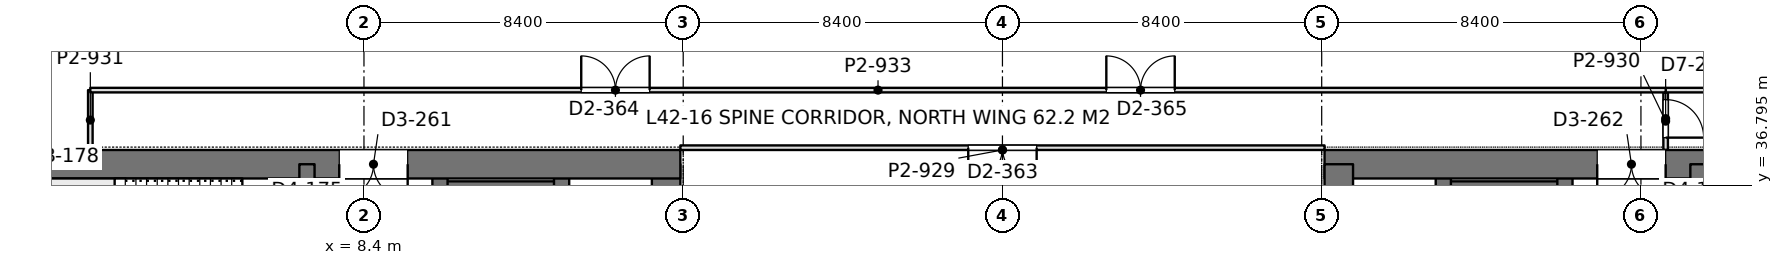
"""IFC4 building model, lengths in metres.
Left out: names, types, materials, properties, quantities, classifications, styles, units other than length and angle.
Written with IfcOpenShell. Run it as: python <this file> out.ifc"""

import sys

from ifc_helpers import new_model, si_unit, direction, frame, frame_2d, origin, place, context, subcontext, project, spatial, rectangle, extrude, element, fill, save


model = new_model("IFC4")
c1 = context("Model", 3, precision=1e-05, world=origin(), true_north=direction((0.0, 1.0)))
c2 = subcontext(c1, "Body", "Model", "MODEL_VIEW")
j1 = project(units=[si_unit("LENGTHUNIT", "METRE"), si_unit("PLANEANGLEUNIT", "RADIAN")], contexts=[c1])
p1 = place(None, origin())
s1 = spatial("IfcSite", under=j1, at=p1, CompositionType="ELEMENT")
p2 = place(p1, origin())
s2 = spatial("IfcBuilding", under=s1, at=p2, CompositionType="ELEMENT")
p3 = place(p2, frame((0.0, 0.0, 186.0)))
s3 = spatial("IfcBuildingStorey", under=s2, at=p3, CompositionType="ELEMENT", Elevation=186.0)
p4 = place(p3, frame((-1.125, 37.35, 0.0), z_axis=(0.0, 0.0, 1.0), x_axis=(1.0, 0.0, 0.0)))
e1 = element("IfcWall", 1, at=p4, inside=s3, PredefinedType="SHEAR", context=c2, shape_type="SweptSolid", body=[
    extrude(rectangle(XDim=17.85, YDim=0.75, at=frame_2d((8.925, 0.0))), origin(), (0.0, 0.0, 1.0), 4.2),
])
p5 = place(p4, frame((8.875, 0.0, 0.0)))
e2 = element("IfcOpeningElement", 2, at=p5, cuts=e1, PredefinedType="OPENING", context=c2, shape_type="SweptSolid", body=[
    extrude(rectangle(XDim=1.8, YDim=2.4, at=frame_2d((0.9, 1.2))), frame((0.0, 0.385, 0.0), z_axis=(0.0, -1.0, 0.0), x_axis=(1.0, 0.0, 0.0)), (0.0, 0.0, 1.0), 0.77),
])
p6 = place(p3, frame((16.35, 27.8, 0.0), z_axis=(0.0, 0.0, 1.0), x_axis=(0.0, 1.0, 0.0)))
e3 = element("IfcWall", 3, at=p6, inside=s3, PredefinedType="SHEAR", context=c2, shape_type="SweptSolid", body=[
    extrude(rectangle(XDim=9.55, YDim=0.75, at=frame_2d((4.775, 0.0))), origin(), (0.0, 0.0, 1.0), 4.2),
])
p7 = place(p3, frame((6.9, 13.05, 0.0), z_axis=(0.0, 0.0, 1.0), x_axis=(0.0, 1.0, 0.0)))
e4 = element("IfcWall", 4, at=p7, inside=s3, PredefinedType="SHEAR", context=c2, shape_type="SweptSolid", body=[
    extrude(rectangle(XDim=24.3, YDim=0.4, at=frame_2d((12.15, 0.0))), origin(), (0.0, 0.0, 1.0), 4.2),
])
p8 = place(p7, frame((1.3, 0.0, 0.0)))
e5 = element("IfcOpeningElement", 5, at=p8, cuts=e4, PredefinedType="OPENING", context=c2, shape_type="SweptSolid", body=[
    extrude(rectangle(XDim=1.0, YDim=2.2, at=frame_2d((0.5, 1.1))), frame((0.0, 0.21, 0.0), z_axis=(0.0, -1.0, 0.0), x_axis=(1.0, 0.0, 0.0)), (0.0, 0.0, 1.0), 0.42),
])
p9 = place(p7, frame((22.0, 0.0, 0.0)))
e6 = element("IfcOpeningElement", 6, at=p9, cuts=e4, PredefinedType="OPENING", context=c2, shape_type="SweptSolid", body=[
    extrude(rectangle(XDim=1.0, YDim=2.2, at=frame_2d((0.5, 1.1))), frame((0.0, 0.21, 0.0), z_axis=(0.0, -1.0, 0.0), x_axis=(1.0, 0.0, 0.0)), (0.0, 0.0, 1.0), 0.42),
])
p10 = place(p7, frame((5.55, 0.0, 0.0)))
e7 = element("IfcOpeningElement", 7, at=p10, cuts=e4, PredefinedType="OPENING", context=c2, shape_type="SweptSolid", body=[
    extrude(rectangle(XDim=1.0, YDim=2.2, at=frame_2d((0.5, 1.1))), frame((0.0, 0.21, 0.0), z_axis=(0.0, -1.0, 0.0), x_axis=(1.0, 0.0, 0.0)), (0.0, 0.0, 1.0), 0.42),
])
p11 = place(p7, frame((9.55, 0.0, 0.0)))
e8 = element("IfcOpeningElement", 8, at=p11, cuts=e4, PredefinedType="OPENING", context=c2, shape_type="SweptSolid", body=[
    extrude(rectangle(XDim=1.0, YDim=2.2, at=frame_2d((0.5, 1.1))), frame((0.0, 0.21, 0.0), z_axis=(0.0, -1.0, 0.0), x_axis=(1.0, 0.0, 0.0)), (0.0, 0.0, 1.0), 0.42),
])
p12 = place(p7, frame((12.8, 0.0, 0.0)))
e9 = element("IfcOpeningElement", 9, at=p12, cuts=e4, PredefinedType="OPENING", context=c2, shape_type="SweptSolid", body=[
    extrude(rectangle(XDim=1.1, YDim=2.2, at=frame_2d((0.55, 1.1))), frame((0.0, 0.21, 0.0), z_axis=(0.0, -1.0, 0.0), x_axis=(1.0, 0.0, 0.0)), (0.0, 0.0, 1.0), 0.42),
])
p13 = place(p7, frame((15.538, 0.0, 0.0)))
e10 = element("IfcOpeningElement", 10, at=p13, cuts=e4, PredefinedType="OPENING", context=c2, shape_type="SweptSolid", body=[
    extrude(rectangle(XDim=1.1, YDim=2.2, at=frame_2d((0.55, 1.1))), frame((0.0, 0.21, 0.0), z_axis=(0.0, -1.0, 0.0), x_axis=(1.0, 0.0, 0.0)), (0.0, 0.0, 1.0), 0.42),
])
p14 = place(p7, frame((18.262, 0.0, 0.0)))
e11 = element("IfcOpeningElement", 11, at=p14, cuts=e4, PredefinedType="OPENING", context=c2, shape_type="SweptSolid", body=[
    extrude(rectangle(XDim=1.1, YDim=2.2, at=frame_2d((0.55, 1.1))), frame((0.0, 0.21, 0.0), z_axis=(0.0, -1.0, 0.0), x_axis=(1.0, 0.0, 0.0)), (0.0, 0.0, 1.0), 0.42),
])
p15 = place(p3, frame((10.4, 13.05, 0.0), z_axis=(0.0, 0.0, 1.0), x_axis=(0.0, 1.0, 0.0)))
e12 = element("IfcWall", 12, at=p15, inside=s3, PredefinedType="SHEAR", context=c2, shape_type="SweptSolid", body=[
    extrude(rectangle(XDim=24.3, YDim=0.4, at=frame_2d((12.15, 0.0))), origin(), (0.0, 0.0, 1.0), 4.2),
])
p16 = place(p15, frame((15.75, 0.0, 0.0)))
e13 = element("IfcOpeningElement", 13, at=p16, cuts=e12, PredefinedType="OPENING", context=c2, shape_type="SweptSolid", body=[
    extrude(rectangle(XDim=1.1, YDim=2.2, at=frame_2d((0.55, 1.1))), frame((0.0, 0.21, 0.0), z_axis=(0.0, -1.0, 0.0), x_axis=(1.0, 0.0, 0.0)), (0.0, 0.0, 1.0), 0.42),
])
p17 = place(p15, frame((18.6, 0.0, 0.0)))
e14 = element("IfcOpeningElement", 14, at=p17, cuts=e12, PredefinedType="OPENING", context=c2, shape_type="SweptSolid", body=[
    extrude(rectangle(XDim=1.1, YDim=2.2, at=frame_2d((0.55, 1.1))), frame((0.0, 0.21, 0.0), z_axis=(0.0, -1.0, 0.0), x_axis=(1.0, 0.0, 0.0)), (0.0, 0.0, 1.0), 0.42),
])
p18 = place(p15, frame((21.45, 0.0, 0.0)))
e15 = element("IfcOpeningElement", 15, at=p18, cuts=e12, PredefinedType="OPENING", context=c2, shape_type="SweptSolid", body=[
    extrude(rectangle(XDim=1.1, YDim=2.2, at=frame_2d((0.55, 1.1))), frame((0.0, 0.21, 0.0), z_axis=(0.0, -1.0, 0.0), x_axis=(1.0, 0.0, 0.0)), (0.0, 0.0, 1.0), 0.42),
])
p19 = place(p15, frame((6.05, 0.0, 0.0)))
e16 = element("IfcOpeningElement", 16, at=p19, cuts=e12, PredefinedType="OPENING", context=c2, shape_type="SweptSolid", body=[
    extrude(rectangle(XDim=1.8, YDim=2.4, at=frame_2d((0.9, 1.2))), frame((0.0, 0.21, 0.0), z_axis=(0.0, -1.0, 0.0), x_axis=(1.0, 0.0, 0.0)), (0.0, 0.0, 1.0), 0.42),
])
p20 = place(p15, frame((11.25, 0.0, 0.0)))
e17 = element("IfcOpeningElement", 17, at=p20, cuts=e12, PredefinedType="OPENING", context=c2, shape_type="SweptSolid", body=[
    extrude(rectangle(XDim=1.8, YDim=2.4, at=frame_2d((0.9, 1.2))), frame((0.0, 0.21, 0.0), z_axis=(0.0, -1.0, 0.0), x_axis=(1.0, 0.0, 0.0)), (0.0, 0.0, 1.0), 0.42),
])
p21 = place(p3, frame((13.6, 27.925, 0.0), z_axis=(0.0, 0.0, 1.0), x_axis=(0.0, 1.0, 0.0)))
e18 = element("IfcWall", 18, at=p21, inside=s3, PredefinedType="SHEAR", context=c2, shape_type="SweptSolid", body=[
    extrude(rectangle(XDim=9.425, YDim=0.4, at=frame_2d((4.712, 0.0))), origin(), (0.0, 0.0, 1.0), 4.2),
])
p22 = place(p3, frame((10.4, 36.625, 0.0), z_axis=(0.0, 0.0, 1.0), x_axis=(1.0, 0.0, 0.0)))
e19 = element("IfcWall", 19, at=p22, inside=s3, PredefinedType="SHEAR", context=c2, shape_type="SweptSolid", body=[
    extrude(rectangle(XDim=3.2, YDim=0.55, at=frame_2d((1.6, 0.0))), origin(), (0.0, 0.0, 1.0), 4.2),
])
p23 = place(p3, frame((33.675, 37.35, 0.0), z_axis=(0.0, 0.0, 1.0), x_axis=(1.0, 0.0, 0.0)))
e20 = element("IfcWall", 20, at=p23, inside=s3, PredefinedType="SHEAR", context=c2, shape_type="SweptSolid", body=[
    extrude(rectangle(XDim=17.85, YDim=0.75, at=frame_2d((8.925, 0.0))), origin(), (0.0, 0.0, 1.0), 4.2),
])
p24 = place(p23, frame((7.175, 0.0, 0.0)))
e21 = element("IfcOpeningElement", 21, at=p24, cuts=e20, PredefinedType="OPENING", context=c2, shape_type="SweptSolid", body=[
    extrude(rectangle(XDim=1.8, YDim=2.4, at=frame_2d((0.9, 1.2))), frame((0.0, 0.385, 0.0), z_axis=(0.0, -1.0, 0.0), x_axis=(1.0, 0.0, 0.0)), (0.0, 0.0, 1.0), 0.77),
])
p25 = place(p3, frame((34.05, 27.8, 0.0), z_axis=(0.0, 0.0, 1.0), x_axis=(0.0, 1.0, 0.0)))
e22 = element("IfcWall", 22, at=p25, inside=s3, PredefinedType="SHEAR", context=c2, shape_type="SweptSolid", body=[
    extrude(rectangle(XDim=9.55, YDim=0.75, at=frame_2d((4.775, 0.0))), origin(), (0.0, 0.0, 1.0), 4.2),
])
p26 = place(p3, frame((43.5, 13.05, 0.0), z_axis=(0.0, 0.0, 1.0), x_axis=(0.0, 1.0, 0.0)))
e23 = element("IfcWall", 23, at=p26, inside=s3, PredefinedType="SHEAR", context=c2, shape_type="SweptSolid", body=[
    extrude(rectangle(XDim=24.3, YDim=0.4, at=frame_2d((12.15, 0.0))), origin(), (0.0, 0.0, 1.0), 4.2),
])
p27 = place(p26, frame((1.3, 0.0, 0.0)))
e24 = element("IfcOpeningElement", 24, at=p27, cuts=e23, PredefinedType="OPENING", context=c2, shape_type="SweptSolid", body=[
    extrude(rectangle(XDim=1.0, YDim=2.2, at=frame_2d((0.5, 1.1))), frame((0.0, 0.21, 0.0), z_axis=(0.0, -1.0, 0.0), x_axis=(1.0, 0.0, 0.0)), (0.0, 0.0, 1.0), 0.42),
])
p28 = place(p26, frame((22.0, 0.0, 0.0)))
e25 = element("IfcOpeningElement", 25, at=p28, cuts=e23, PredefinedType="OPENING", context=c2, shape_type="SweptSolid", body=[
    extrude(rectangle(XDim=1.0, YDim=2.2, at=frame_2d((0.5, 1.1))), frame((0.0, 0.21, 0.0), z_axis=(0.0, -1.0, 0.0), x_axis=(1.0, 0.0, 0.0)), (0.0, 0.0, 1.0), 0.42),
])
p29 = place(p26, frame((5.55, 0.0, 0.0)))
e26 = element("IfcOpeningElement", 26, at=p29, cuts=e23, PredefinedType="OPENING", context=c2, shape_type="SweptSolid", body=[
    extrude(rectangle(XDim=1.0, YDim=2.2, at=frame_2d((0.5, 1.1))), frame((0.0, 0.21, 0.0), z_axis=(0.0, -1.0, 0.0), x_axis=(1.0, 0.0, 0.0)), (0.0, 0.0, 1.0), 0.42),
])
p30 = place(p26, frame((9.55, 0.0, 0.0)))
e27 = element("IfcOpeningElement", 27, at=p30, cuts=e23, PredefinedType="OPENING", context=c2, shape_type="SweptSolid", body=[
    extrude(rectangle(XDim=1.0, YDim=2.2, at=frame_2d((0.5, 1.1))), frame((0.0, 0.21, 0.0), z_axis=(0.0, -1.0, 0.0), x_axis=(1.0, 0.0, 0.0)), (0.0, 0.0, 1.0), 0.42),
])
p31 = place(p26, frame((12.8, 0.0, 0.0)))
e28 = element("IfcOpeningElement", 28, at=p31, cuts=e23, PredefinedType="OPENING", context=c2, shape_type="SweptSolid", body=[
    extrude(rectangle(XDim=1.1, YDim=2.2, at=frame_2d((0.55, 1.1))), frame((0.0, 0.21, 0.0), z_axis=(0.0, -1.0, 0.0), x_axis=(1.0, 0.0, 0.0)), (0.0, 0.0, 1.0), 0.42),
])
p32 = place(p26, frame((15.538, 0.0, 0.0)))
e29 = element("IfcOpeningElement", 29, at=p32, cuts=e23, PredefinedType="OPENING", context=c2, shape_type="SweptSolid", body=[
    extrude(rectangle(XDim=1.1, YDim=2.2, at=frame_2d((0.55, 1.1))), frame((0.0, 0.21, 0.0), z_axis=(0.0, -1.0, 0.0), x_axis=(1.0, 0.0, 0.0)), (0.0, 0.0, 1.0), 0.42),
])
p33 = place(p26, frame((18.262, 0.0, 0.0)))
e30 = element("IfcOpeningElement", 30, at=p33, cuts=e23, PredefinedType="OPENING", context=c2, shape_type="SweptSolid", body=[
    extrude(rectangle(XDim=1.1, YDim=2.2, at=frame_2d((0.55, 1.1))), frame((0.0, 0.21, 0.0), z_axis=(0.0, -1.0, 0.0), x_axis=(1.0, 0.0, 0.0)), (0.0, 0.0, 1.0), 0.42),
])
p34 = place(p3, frame((40.0, 13.05, 0.0), z_axis=(0.0, 0.0, 1.0), x_axis=(0.0, 1.0, 0.0)))
e31 = element("IfcWall", 31, at=p34, inside=s3, PredefinedType="SHEAR", context=c2, shape_type="SweptSolid", body=[
    extrude(rectangle(XDim=24.3, YDim=0.4, at=frame_2d((12.15, 0.0))), origin(), (0.0, 0.0, 1.0), 4.2),
])
p35 = place(p34, frame((15.75, 0.0, 0.0)))
e32 = element("IfcOpeningElement", 32, at=p35, cuts=e31, PredefinedType="OPENING", context=c2, shape_type="SweptSolid", body=[
    extrude(rectangle(XDim=1.1, YDim=2.2, at=frame_2d((0.55, 1.1))), frame((0.0, 0.21, 0.0), z_axis=(0.0, -1.0, 0.0), x_axis=(1.0, 0.0, 0.0)), (0.0, 0.0, 1.0), 0.42),
])
p36 = place(p34, frame((18.6, 0.0, 0.0)))
e33 = element("IfcOpeningElement", 33, at=p36, cuts=e31, PredefinedType="OPENING", context=c2, shape_type="SweptSolid", body=[
    extrude(rectangle(XDim=1.1, YDim=2.2, at=frame_2d((0.55, 1.1))), frame((0.0, 0.21, 0.0), z_axis=(0.0, -1.0, 0.0), x_axis=(1.0, 0.0, 0.0)), (0.0, 0.0, 1.0), 0.42),
])
p37 = place(p34, frame((21.45, 0.0, 0.0)))
e34 = element("IfcOpeningElement", 34, at=p37, cuts=e31, PredefinedType="OPENING", context=c2, shape_type="SweptSolid", body=[
    extrude(rectangle(XDim=1.1, YDim=2.2, at=frame_2d((0.55, 1.1))), frame((0.0, 0.21, 0.0), z_axis=(0.0, -1.0, 0.0), x_axis=(1.0, 0.0, 0.0)), (0.0, 0.0, 1.0), 0.42),
])
p38 = place(p34, frame((6.05, 0.0, 0.0)))
e35 = element("IfcOpeningElement", 35, at=p38, cuts=e31, PredefinedType="OPENING", context=c2, shape_type="SweptSolid", body=[
    extrude(rectangle(XDim=1.8, YDim=2.4, at=frame_2d((0.9, 1.2))), frame((0.0, 0.21, 0.0), z_axis=(0.0, -1.0, 0.0), x_axis=(1.0, 0.0, 0.0)), (0.0, 0.0, 1.0), 0.42),
])
p39 = place(p34, frame((11.25, 0.0, 0.0)))
e36 = element("IfcOpeningElement", 36, at=p39, cuts=e31, PredefinedType="OPENING", context=c2, shape_type="SweptSolid", body=[
    extrude(rectangle(XDim=1.8, YDim=2.4, at=frame_2d((0.9, 1.2))), frame((0.0, 0.21, 0.0), z_axis=(0.0, -1.0, 0.0), x_axis=(1.0, 0.0, 0.0)), (0.0, 0.0, 1.0), 0.42),
])
p40 = place(p3, frame((36.8, 27.925, 0.0), z_axis=(0.0, 0.0, 1.0), x_axis=(0.0, 1.0, 0.0)))
e37 = element("IfcWall", 37, at=p40, inside=s3, PredefinedType="SHEAR", context=c2, shape_type="SweptSolid", body=[
    extrude(rectangle(XDim=9.425, YDim=0.4, at=frame_2d((4.712, 0.0))), origin(), (0.0, 0.0, 1.0), 4.2),
])
p41 = place(p3, frame((40.0, 36.625, 0.0), z_axis=(0.0, 0.0, 1.0), x_axis=(-1.0, 0.0, 0.0)))
e38 = element("IfcWall", 38, at=p41, inside=s3, PredefinedType="SHEAR", context=c2, shape_type="SweptSolid", body=[
    extrude(rectangle(XDim=3.2, YDim=0.55, at=frame_2d((1.6, 0.0))), origin(), (0.0, 0.0, 1.0), 4.2),
])
p42 = place(p3, frame((1.2, 39.3, 0.0), z_axis=(0.0, 0.0, 1.0), x_axis=(1.0, 0.0, 0.0)))
e39 = element("IfcWall", 39, at=p42, inside=s3, PredefinedType="PARTITIONING", context=c2, shape_type="SweptSolid", body=[
    extrude(rectangle(XDim=41.452, YDim=0.12, at=frame_2d((20.726, 0.0))), origin(), (0.0, 0.0, 1.0), 3.55),
])
p43 = place(p42, frame((12.917, 0.0, 0.0)))
e40 = element("IfcOpeningElement", 40, at=p43, cuts=e39, PredefinedType="OPENING", context=c2, shape_type="SweptSolid", body=[
    extrude(rectangle(XDim=1.8, YDim=2.2, at=frame_2d((0.9, 1.1))), frame((0.0, 0.07, 0.0), z_axis=(0.0, -1.0, 0.0), x_axis=(1.0, 0.0, 0.0)), (0.0, 0.0, 1.0), 0.14),
])
p44 = place(p42, frame((26.733, 0.0, 0.0)))
e41 = element("IfcOpeningElement", 41, at=p44, cuts=e39, PredefinedType="OPENING", context=c2, shape_type="SweptSolid", body=[
    extrude(rectangle(XDim=1.8, YDim=2.2, at=frame_2d((0.9, 1.1))), frame((0.0, 0.07, 0.0), z_axis=(0.0, -1.0, 0.0), x_axis=(1.0, 0.0, 0.0)), (0.0, 0.0, 1.0), 0.14),
])
p45 = place(p3, frame((1.2, 37.724, 0.0), z_axis=(0.0, 0.0, 1.0), x_axis=(0.0, 1.0, 0.0)))
e42 = element("IfcWall", 42, at=p45, inside=s3, PredefinedType="PARTITIONING", context=c2, shape_type="SweptSolid", body=[
    extrude(rectangle(XDim=1.576, YDim=0.12, at=frame_2d((0.788, 0.0))), origin(), (0.0, 0.0, 1.0), 4.05),
])
p46 = place(p3, frame((42.65, 37.724, 0.0), z_axis=(0.0, 0.0, 1.0), x_axis=(0.0, 1.0, 0.0)))
e43 = element("IfcWall", 43, at=p46, inside=s3, PredefinedType="PARTITIONING", context=c2, shape_type="SweptSolid", body=[
    extrude(rectangle(XDim=1.518, YDim=0.12, at=frame_2d((0.759, 0.0))), origin(), (0.0, 0.0, 1.0), 4.05),
])
p47 = place(p46, frame((0.326, 0.0, 0.0)))
e44 = element("IfcOpeningElement", 44, at=p47, cuts=e43, PredefinedType="OPENING", context=c2, shape_type="SweptSolid", body=[
    extrude(rectangle(XDim=1.0, YDim=2.4, at=frame_2d((0.5, 1.2))), frame((0.0, 0.07, 0.0), z_axis=(0.0, -1.0, 0.0), x_axis=(1.0, 0.0, 0.0)), (0.0, 0.0, 1.0), 0.14),
])
p48 = place(p3, frame((42.648, 39.3, 0.0), z_axis=(0.0, 0.0, 1.0), x_axis=(1.0, 0.0, 0.0)))
e45 = element("IfcWall", 45, at=p48, inside=s3, PredefinedType="PARTITIONING", context=c2, shape_type="SweptSolid", body=[
    extrude(rectangle(XDim=6.552, YDim=0.12, at=frame_2d((3.276, 0.0))), origin(), (0.0, 0.0, 1.0), 3.69),
])
p49 = place(p3, frame((16.725, 37.785, 0.0), z_axis=(0.0, 0.0, 1.0), x_axis=(1.0, 0.0, 0.0)))
e46 = element("IfcWall", 46, at=p49, inside=s3, PredefinedType="PARTITIONING", context=c2, shape_type="SweptSolid", body=[
    extrude(rectangle(XDim=16.95, YDim=0.12, at=frame_2d((8.475, 0.0))), origin(), (0.0, 0.0, 1.0), 3.55),
])
p50 = place(p49, frame((7.575, 0.0, 0.0)))
e47 = element("IfcOpeningElement", 47, at=p50, cuts=e46, PredefinedType="OPENING", context=c2, shape_type="SweptSolid", body=[
    extrude(rectangle(XDim=1.8, YDim=2.2, at=frame_2d((0.9, 1.1))), frame((0.0, 0.07, 0.0), z_axis=(0.0, -1.0, 0.0), x_axis=(1.0, 0.0, 0.0)), (0.0, 0.0, 1.0), 0.14),
])
p51 = place(p5, frame((1.8, 0.0, 0.0), z_axis=(0.0, 0.0, 1.0), x_axis=(-1.0, 0.0, 0.0)))
e48 = element("IfcDoor", 48, at=p51, inside=s3, OperationType="DOUBLE_DOOR_SINGLE_SWING", PredefinedType="DOOR", context=c2, shape_type="SweptSolid", body=[
    extrude(rectangle(XDim=1.8, YDim=2.4, at=frame_2d((0.9, 1.2))), frame((0.0, 0.025, 0.0), z_axis=(0.0, -1.0, 0.0), x_axis=(1.0, 0.0, 0.0)), (0.0, 0.0, 1.0), 0.05),
])
fill(e2, e48)
p52 = place(p24, frame((1.8, 0.0, 0.0), z_axis=(0.0, 0.0, 1.0), x_axis=(-1.0, 0.0, 0.0)))
e49 = element("IfcDoor", 49, at=p52, inside=s3, OperationType="DOUBLE_DOOR_SINGLE_SWING", PredefinedType="DOOR", context=c2, shape_type="SweptSolid", body=[
    extrude(rectangle(XDim=1.8, YDim=2.4, at=frame_2d((0.9, 1.2))), frame((0.0, 0.025, 0.0), z_axis=(0.0, -1.0, 0.0), x_axis=(1.0, 0.0, 0.0)), (0.0, 0.0, 1.0), 0.05),
])
fill(e21, e49)
p53 = place(p43, origin())
e50 = element("IfcDoor", 50, at=p53, inside=s3, OperationType="DOUBLE_DOOR_SINGLE_SWING", PredefinedType="DOOR", context=c2, shape_type="SweptSolid", body=[
    extrude(rectangle(XDim=1.8, YDim=2.2, at=frame_2d((0.9, 1.1))), frame((0.0, 0.025, 0.0), z_axis=(0.0, -1.0, 0.0), x_axis=(1.0, 0.0, 0.0)), (0.0, 0.0, 1.0), 0.05),
])
fill(e40, e50)
p54 = place(p44, origin())
e51 = element("IfcDoor", 51, at=p54, inside=s3, OperationType="DOUBLE_DOOR_SINGLE_SWING", PredefinedType="DOOR", context=c2, shape_type="SweptSolid", body=[
    extrude(rectangle(XDim=1.8, YDim=2.2, at=frame_2d((0.9, 1.1))), frame((0.0, 0.025, 0.0), z_axis=(0.0, -1.0, 0.0), x_axis=(1.0, 0.0, 0.0)), (0.0, 0.0, 1.0), 0.05),
])
fill(e41, e51)
p55 = place(p47, frame((1.0, 0.0, 0.0), z_axis=(0.0, 0.0, 1.0), x_axis=(-1.0, 0.0, 0.0)))
e52 = element("IfcDoor", 52, at=p55, inside=s3, OperationType="SINGLE_SWING_RIGHT", PredefinedType="DOOR", context=c2, shape_type="SweptSolid", body=[
    extrude(rectangle(XDim=1.0, YDim=2.4, at=frame_2d((0.5, 1.2))), frame((0.0, 0.025, 0.0), z_axis=(0.0, -1.0, 0.0), x_axis=(1.0, 0.0, 0.0)), (0.0, 0.0, 1.0), 0.05),
])
fill(e44, e52)
p56 = place(p50, frame((1.8, 0.0, 0.0), z_axis=(0.0, 0.0, 1.0), x_axis=(-1.0, 0.0, 0.0)))
e53 = element("IfcDoor", 53, at=p56, inside=s3, OperationType="DOUBLE_DOOR_SINGLE_SWING", PredefinedType="DOOR", context=c2, shape_type="SweptSolid", body=[
    extrude(rectangle(XDim=1.8, YDim=2.2, at=frame_2d((0.9, 1.1))), frame((0.0, 0.025, 0.0), z_axis=(0.0, -1.0, 0.0), x_axis=(1.0, 0.0, 0.0)), (0.0, 0.0, 1.0), 0.05),
])
fill(e47, e53)
save(model, sys.argv[1])
